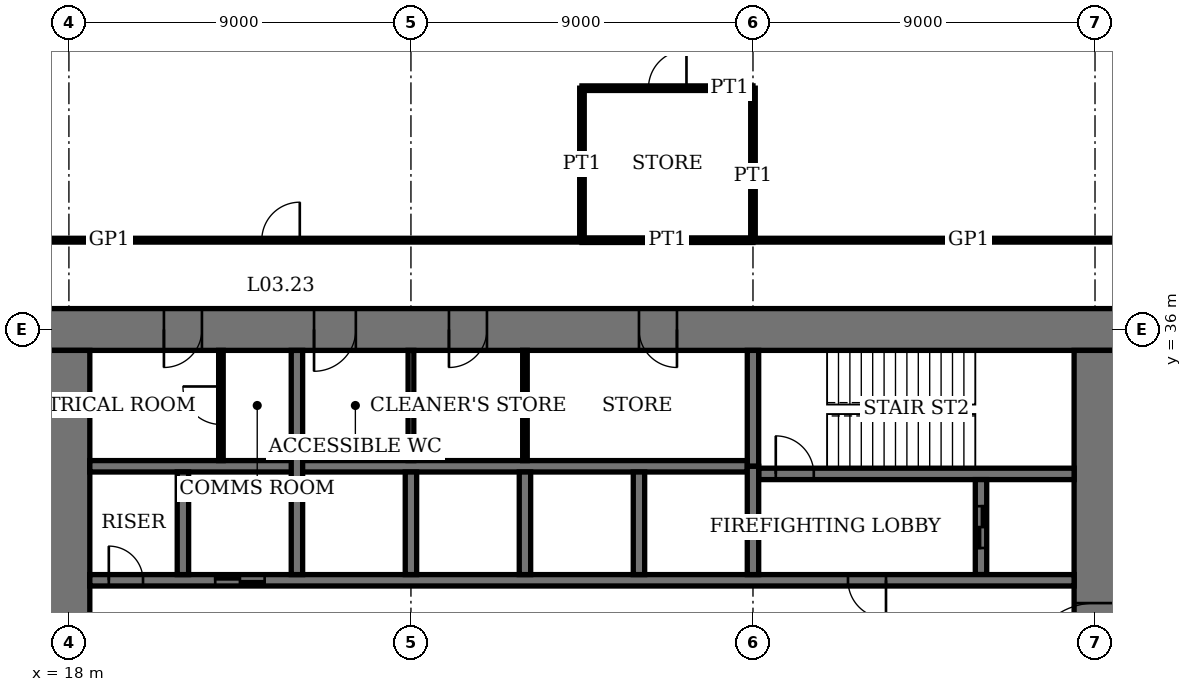
"""IFC4 building model, lengths in metres.
Left out: names, types, materials, properties, quantities, classifications, styles, units other than length and angle.
Written with IfcOpenShell. Run it as: python <this file> out.ifc"""

import sys

from ifc_helpers import new_model, si_unit, direction, frame, frame_2d, origin, place, context, subcontext, project, spatial, rectangle, extrude, element, fill, save


model = new_model("IFC4")
c1 = context("Model", 3, precision=1e-05, world=origin(), true_north=direction((0.0, 1.0)))
c2 = subcontext(c1, "Body", "Model", "MODEL_VIEW")
j1 = project(units=[si_unit("LENGTHUNIT", "METRE"), si_unit("PLANEANGLEUNIT", "RADIAN")], contexts=[c1])
p1 = place(None, origin())
s1 = spatial("IfcSite", under=j1, at=p1, CompositionType="ELEMENT")
p2 = place(p1, origin())
s2 = spatial("IfcBuilding", under=s1, at=p2, CompositionType="ELEMENT")
p3 = place(p2, frame((0.0, 0.0, 15.8)))
s3 = spatial("IfcBuildingStorey", under=s2, at=p3, CompositionType="ELEMENT", Elevation=15.8)
p4 = place(p3, frame((45.55, 36.0, 0.0), z_axis=(0.0, 0.0, 1.0), x_axis=(-1.0, 0.0, 0.0)))
e1 = element("IfcWall", 1, at=p4, inside=s3, PredefinedType="SHEAR", context=c2, shape_type="SweptSolid", body=[
    extrude(rectangle(XDim=28.1, YDim=1.1, at=frame_2d((14.05, 0.0))), origin(), (0.0, 0.0, 1.0), 4.0),
])
p5 = place(p4, frame((11.55, 0.0, 0.0)))
e2 = element("IfcOpeningElement", 2, at=p5, cuts=e1, PredefinedType="OPENING", context=c2, shape_type="SweptSolid", body=[
    extrude(rectangle(XDim=1.0, YDim=2.4, at=frame_2d((0.5, 1.2))), frame((0.0, 0.56, 0.0), z_axis=(0.0, -1.0, 0.0), x_axis=(1.0, 0.0, 0.0)), (0.0, 0.0, 1.0), 1.12),
])
p6 = place(p4, frame((16.55, 0.0, 0.0)))
e3 = element("IfcOpeningElement", 3, at=p6, cuts=e1, PredefinedType="OPENING", context=c2, shape_type="SweptSolid", body=[
    extrude(rectangle(XDim=1.0, YDim=2.4, at=frame_2d((0.5, 1.2))), frame((0.0, 0.56, 0.0), z_axis=(0.0, -1.0, 0.0), x_axis=(1.0, 0.0, 0.0)), (0.0, 0.0, 1.0), 1.12),
])
p7 = place(p4, frame((20.0, 0.0, 0.0)))
e4 = element("IfcOpeningElement", 4, at=p7, cuts=e1, PredefinedType="OPENING", context=c2, shape_type="SweptSolid", body=[
    extrude(rectangle(XDim=1.1, YDim=2.4, at=frame_2d((0.55, 1.2))), frame((0.0, 0.56, 0.0), z_axis=(0.0, -1.0, 0.0), x_axis=(1.0, 0.0, 0.0)), (0.0, 0.0, 1.0), 1.12),
])
p8 = place(p4, frame((24.05, 0.0, 0.0)))
e5 = element("IfcOpeningElement", 5, at=p8, cuts=e1, PredefinedType="OPENING", context=c2, shape_type="SweptSolid", body=[
    extrude(rectangle(XDim=1.0, YDim=2.4, at=frame_2d((0.5, 1.2))), frame((0.0, 0.56, 0.0), z_axis=(0.0, -1.0, 0.0), x_axis=(1.0, 0.0, 0.0)), (0.0, 0.0, 1.0), 1.12),
])
p9 = place(p3, frame((18.0, 35.45, 0.0), z_axis=(0.0, 0.0, 1.0), x_axis=(0.0, -1.0, 0.0)))
e6 = element("IfcWall", 6, at=p9, inside=s3, PredefinedType="SHEAR", context=c2, shape_type="SweptSolid", body=[
    extrude(rectangle(XDim=16.9, YDim=1.1, at=frame_2d((8.45, 0.0))), origin(), (0.0, 0.0, 1.0), 4.0),
])
p10 = place(p9, frame((8.45, 0.0, 0.0)))
e7 = element("IfcOpeningElement", 7, at=p10, cuts=e6, PredefinedType="OPENING", context=c2, shape_type="SweptSolid", body=[
    extrude(rectangle(XDim=1.8, YDim=2.4, at=frame_2d((0.9, 1.2))), frame((0.0, 0.56, 0.0), z_axis=(0.0, -1.0, 0.0), x_axis=(1.0, 0.0, 0.0)), (0.0, 0.0, 1.0), 1.12),
])
p11 = place(p3, frame((45.0, 18.55, 0.0), z_axis=(0.0, 0.0, 1.0), x_axis=(0.0, 1.0, 0.0)))
e8 = element("IfcWall", 8, at=p11, inside=s3, PredefinedType="SHEAR", context=c2, shape_type="SweptSolid", body=[
    extrude(rectangle(XDim=16.9, YDim=1.1, at=frame_2d((8.45, 0.0))), origin(), (0.0, 0.0, 1.0), 4.0),
])
p12 = place(p11, frame((8.45, 0.0, 0.0)))
e9 = element("IfcOpeningElement", 9, at=p12, cuts=e8, PredefinedType="OPENING", context=c2, shape_type="SweptSolid", body=[
    extrude(rectangle(XDim=1.8, YDim=2.4, at=frame_2d((0.9, 1.2))), frame((0.0, 0.56, 0.0), z_axis=(0.0, -1.0, 0.0), x_axis=(1.0, 0.0, 0.0)), (0.0, 0.0, 1.0), 1.12),
])
p13 = place(p3, frame((36.15, 32.2, 0.0), z_axis=(0.0, 0.0, 1.0), x_axis=(1.0, 0.0, 0.0)))
e10 = element("IfcWall", 10, at=p13, inside=s3, PredefinedType="SHEAR", context=c2, shape_type="SweptSolid", body=[
    extrude(rectangle(XDim=8.3, YDim=0.3, at=frame_2d((4.15, 0.0))), origin(), (0.0, 0.0, 1.0), 4.0),
])
p14 = place(p13, frame((0.45, 0.0, 0.0)))
e11 = element("IfcOpeningElement", 11, at=p14, cuts=e10, PredefinedType="OPENING", context=c2, shape_type="SweptSolid", body=[
    extrude(rectangle(XDim=1.0, YDim=2.4, at=frame_2d((0.5, 1.2))), frame((0.0, 0.16, 0.0), z_axis=(0.0, -1.0, 0.0), x_axis=(1.0, 0.0, 0.0)), (0.0, 0.0, 1.0), 0.32),
])
p15 = place(p3, frame((36.0, 32.4, 0.0), z_axis=(0.0, 0.0, 1.0), x_axis=(0.0, 1.0, 0.0)))
e12 = element("IfcWall", 12, at=p15, inside=s3, PredefinedType="SHEAR", context=c2, shape_type="SweptSolid", body=[
    extrude(rectangle(XDim=3.05, YDim=0.3, at=frame_2d((1.525, 0.0))), origin(), (0.0, 0.0, 1.0), 4.0),
])
p16 = place(p3, frame((42.0, 29.55, 0.0), z_axis=(0.0, 0.0, 1.0), x_axis=(0.0, 1.0, 0.0)))
e13 = element("IfcWall", 13, at=p16, inside=s3, PredefinedType="SHEAR", context=c2, shape_type="SweptSolid", body=[
    extrude(rectangle(XDim=2.5, YDim=0.3, at=frame_2d((1.25, 0.0))), origin(), (0.0, 0.0, 1.0), 4.0),
])
p17 = place(p16, frame((0.7, 0.0, 0.0)))
e14 = element("IfcOpeningElement", 14, at=p17, cuts=e13, PredefinedType="OPENING", context=c2, shape_type="SweptSolid", body=[
    extrude(rectangle(XDim=1.1, YDim=2.4, at=frame_2d((0.55, 1.2))), frame((0.0, 0.16, 0.0), z_axis=(0.0, -1.0, 0.0), x_axis=(1.0, 0.0, 0.0)), (0.0, 0.0, 1.0), 0.32),
])
p18 = place(p3, frame((18.55, 29.4, 0.0), z_axis=(0.0, 0.0, 1.0), x_axis=(1.0, 0.0, 0.0)))
e15 = element("IfcWall", 15, at=p18, inside=s3, PredefinedType="SHEAR", context=c2, shape_type="SweptSolid", body=[
    extrude(rectangle(XDim=25.9, YDim=0.3, at=frame_2d((12.95, 0.0))), origin(), (0.0, 0.0, 1.0), 4.0),
])
p19 = place(p18, frame((19.95, 0.0, 0.0)))
e16 = element("IfcOpeningElement", 16, at=p19, cuts=e15, PredefinedType="OPENING", context=c2, shape_type="SweptSolid", body=[
    extrude(rectangle(XDim=1.0, YDim=2.4, at=frame_2d((0.5, 1.2))), frame((0.0, 0.16, 0.0), z_axis=(0.0, -1.0, 0.0), x_axis=(1.0, 0.0, 0.0)), (0.0, 0.0, 1.0), 0.32),
])
p20 = place(p18, frame((0.5, 0.0, 0.0)))
e17 = element("IfcOpeningElement", 17, at=p20, cuts=e15, PredefinedType="OPENING", context=c2, shape_type="SweptSolid", body=[
    extrude(rectangle(XDim=0.9, YDim=2.1, at=frame_2d((0.45, 1.05))), frame((0.0, 0.16, 0.0), z_axis=(0.0, -1.0, 0.0), x_axis=(1.0, 0.0, 0.0)), (0.0, 0.0, 1.0), 0.32),
])
p21 = place(p18, frame((3.3, 0.0, 0.0)))
e18 = element("IfcOpeningElement", 18, at=p21, cuts=e15, PredefinedType="OPENING", context=c2, shape_type="SweptSolid", body=[
    extrude(rectangle(XDim=1.3, YDim=2.4, at=frame_2d((0.65, 1.2))), frame((0.0, 0.16, 0.0), z_axis=(0.0, -1.0, 0.0), x_axis=(1.0, 0.0, 0.0)), (0.0, 0.0, 1.0), 0.32),
])
p22 = place(p3, frame((18.55, 32.4, 0.0), z_axis=(0.0, 0.0, 1.0), x_axis=(1.0, 0.0, 0.0)))
e19 = element("IfcWall", 19, at=p22, inside=s3, PredefinedType="SHEAR", context=c2, shape_type="SweptSolid", body=[
    extrude(rectangle(XDim=17.3, YDim=0.3, at=frame_2d((8.65, 0.0))), origin(), (0.0, 0.0, 1.0), 4.0),
])
for number, where, z_axis, x_axis in (
    (20, (33.0, 29.55, 0.0), (0.0, 0.0, 1.0), (0.0, 1.0, 0.0)),
    (21, (30.0, 29.55, 0.0), (0.0, 0.0, 1.0), (0.0, 1.0, 0.0)),
    (22, (27.0, 29.55, 0.0), (0.0, 0.0, 1.0), (0.0, 1.0, 0.0)),
):
    element("IfcWall", number, at=place(p3, frame(where, z_axis=z_axis, x_axis=x_axis)), inside=s3, PredefinedType="SHEAR", context=c2, shape_type="SweptSolid", body=[
        extrude(rectangle(XDim=2.7, YDim=0.3, at=frame_2d((1.35, 0.0))), origin(), (0.0, 0.0, 1.0), 4.0),
    ])
p23 = place(p3, frame((24.0, 29.55, 0.0), z_axis=(0.0, 0.0, 1.0), x_axis=(0.0, 1.0, 0.0)))
e23 = element("IfcWall", 23, at=p23, inside=s3, PredefinedType="SHEAR", context=c2, shape_type="SweptSolid", body=[
    extrude(rectangle(XDim=5.9, YDim=0.3, at=frame_2d((2.95, 0.0))), origin(), (0.0, 0.0, 1.0), 4.0),
])
p24 = place(p3, frame((21.0, 29.55, 0.0), z_axis=(0.0, 0.0, 1.0), x_axis=(0.0, 1.0, 0.0)))
e24 = element("IfcWall", 24, at=p24, inside=s3, PredefinedType="SHEAR", context=c2, shape_type="SweptSolid", body=[
    extrude(rectangle(XDim=2.7, YDim=0.3, at=frame_2d((1.35, 0.0))), origin(), (0.0, 0.0, 1.0), 4.0),
])
p25 = place(p3, frame((36.0, 29.55, 0.0), z_axis=(0.0, 0.0, 1.0), x_axis=(0.0, 1.0, 0.0)))
e25 = element("IfcWall", 25, at=p25, inside=s3, PredefinedType="SHEAR", context=c2, shape_type="SweptSolid", body=[
    extrude(rectangle(XDim=2.85, YDim=0.3, at=frame_2d((1.425, 0.0))), origin(), (0.0, 0.0, 1.0), 4.0),
])
p26 = place(p3, frame((31.5, 38.35, 0.0), z_axis=(0.0, 0.0, 1.0), x_axis=(1.0, 0.0, 0.0)))
e26 = element("IfcWall", 26, at=p26, inside=s3, PredefinedType="PARTITIONING", context=c2, shape_type="SweptSolid", body=[
    extrude(rectangle(XDim=4.5, YDim=0.12, at=frame_2d((2.25, 0.0))), origin(), (0.0, 0.0, 1.0), 3.75),
])
p27 = place(p3, frame((15.65, 38.35, 0.0), z_axis=(0.0, 0.0, 1.0), x_axis=(1.0, 0.0, 0.0)))
e27 = element("IfcWall", 27, at=p27, inside=s3, PredefinedType="PARTITIONING", context=c2, shape_type="SweptSolid", body=[
    extrude(rectangle(XDim=15.85, YDim=0.1, at=frame_2d((7.925, 0.0))), origin(), (0.0, 0.0, 1.0), 3.75),
])
p28 = place(p27, frame((7.425, 0.0, 0.0)))
e28 = element("IfcOpeningElement", 28, at=p28, cuts=e27, PredefinedType="OPENING", context=c2, shape_type="SweptSolid", body=[
    extrude(rectangle(XDim=1.0, YDim=2.4, at=frame_2d((0.5, 1.2))), frame((0.0, 0.06, 0.0), z_axis=(0.0, -1.0, 0.0), x_axis=(1.0, 0.0, 0.0)), (0.0, 0.0, 1.0), 0.12),
])
p29 = place(p3, frame((36.0, 38.35, 0.0), z_axis=(0.0, 0.0, 1.0), x_axis=(1.0, 0.0, 0.0)))
e29 = element("IfcWall", 29, at=p29, inside=s3, PredefinedType="PARTITIONING", context=c2, shape_type="SweptSolid", body=[
    extrude(rectangle(XDim=11.35, YDim=0.1, at=frame_2d((5.675, 0.0))), origin(), (0.0, 0.0, 1.0), 3.75),
])
p30 = place(p3, frame((31.5, 42.35, 0.0), z_axis=(0.0, 0.0, 1.0), x_axis=(1.0, 0.0, 0.0)))
e30 = element("IfcWall", 30, at=p30, inside=s3, PredefinedType="PARTITIONING", context=c2, shape_type="SweptSolid", body=[
    extrude(rectangle(XDim=4.5, YDim=0.12, at=frame_2d((2.25, 0.0))), origin(), (0.0, 0.0, 1.0), 3.75),
])
p31 = place(p30, frame((1.75, 0.0, 0.0)))
e31 = element("IfcOpeningElement", 31, at=p31, cuts=e30, PredefinedType="OPENING", context=c2, shape_type="SweptSolid", body=[
    extrude(rectangle(XDim=1.0, YDim=2.4, at=frame_2d((0.5, 1.2))), frame((0.0, 0.07, 0.0), z_axis=(0.0, -1.0, 0.0), x_axis=(1.0, 0.0, 0.0)), (0.0, 0.0, 1.0), 0.14),
])
p32 = place(p3, frame((31.5, 38.35, 0.0), z_axis=(0.0, 0.0, 1.0), x_axis=(0.0, 1.0, 0.0)))
e32 = element("IfcWall", 32, at=p32, inside=s3, PredefinedType="PARTITIONING", context=c2, shape_type="SweptSolid", body=[
    extrude(rectangle(XDim=4.0, YDim=0.12, at=frame_2d((2.0, 0.0))), origin(), (0.0, 0.0, 1.0), 3.75),
])
p33 = place(p3, frame((36.0, 38.35, 0.0), z_axis=(0.0, 0.0, 1.0), x_axis=(0.0, 1.0, 0.0)))
e33 = element("IfcWall", 33, at=p33, inside=s3, PredefinedType="PARTITIONING", context=c2, shape_type="SweptSolid", body=[
    extrude(rectangle(XDim=4.0, YDim=0.12, at=frame_2d((2.0, 0.0))), origin(), (0.0, 0.0, 1.0), 3.05),
])
p34 = place(p3, frame((30.0, 32.55, 0.0), z_axis=(0.0, 0.0, 1.0), x_axis=(0.0, 1.0, 0.0)))
e34 = element("IfcWall", 34, at=p34, inside=s3, PredefinedType="PARTITIONING", context=c2, shape_type="SweptSolid", body=[
    extrude(rectangle(XDim=2.9, YDim=0.12, at=frame_2d((1.45, 0.0))), origin(), (0.0, 0.0, 1.0), 3.75),
])
p35 = place(p3, frame((27.0, 32.55, 0.0), z_axis=(0.0, 0.0, 1.0), x_axis=(0.0, 1.0, 0.0)))
e35 = element("IfcWall", 35, at=p35, inside=s3, PredefinedType="PARTITIONING", context=c2, shape_type="SweptSolid", body=[
    extrude(rectangle(XDim=2.9, YDim=0.15, at=frame_2d((1.45, 0.0))), origin(), (0.0, 0.0, 1.0), 3.75),
])
p36 = place(p3, frame((22.0, 32.55, 0.0), z_axis=(0.0, 0.0, 1.0), x_axis=(0.0, 1.0, 0.0)))
e36 = element("IfcWall", 36, at=p36, inside=s3, PredefinedType="PARTITIONING", context=c2, shape_type="SweptSolid", body=[
    extrude(rectangle(XDim=2.9, YDim=0.12, at=frame_2d((1.45, 0.0))), origin(), (0.0, 0.0, 1.0), 3.75),
])
p37 = place(p36, frame((0.95, 0.0, 0.0)))
e37 = element("IfcOpeningElement", 37, at=p37, cuts=e36, PredefinedType="OPENING", context=c2, shape_type="SweptSolid", body=[
    extrude(rectangle(XDim=1.0, YDim=2.4, at=frame_2d((0.5, 1.2))), frame((0.0, 0.07, 0.0), z_axis=(0.0, -1.0, 0.0), x_axis=(1.0, 0.0, 0.0)), (0.0, 0.0, 1.0), 0.14),
])
p38 = place(p12, origin())
e38 = element("IfcDoor", 38, at=p38, inside=s3, OperationType="DOUBLE_DOOR_DOUBLE_SWING", PredefinedType="DOOR", context=c2, shape_type="SweptSolid", body=[
    extrude(rectangle(XDim=1.8, YDim=2.4, at=frame_2d((0.9, 1.2))), frame((0.0, 0.03, 0.0), z_axis=(0.0, -1.0, 0.0), x_axis=(1.0, 0.0, 0.0)), (0.0, 0.0, 1.0), 0.06),
    extrude(rectangle(XDim=0.04, YDim=2.4, at=frame_2d((0.02, 1.2))), frame((0.0, 0.55, 0.0), z_axis=(0.0, -1.0, 0.0), x_axis=(1.0, 0.0, 0.0)), (0.0, 0.0, 1.0), 1.1),
    extrude(rectangle(XDim=0.04, YDim=2.4, at=frame_2d((1.78, 1.2))), frame((0.0, 0.55, 0.0), z_axis=(0.0, -1.0, 0.0), x_axis=(1.0, 0.0, 0.0)), (0.0, 0.0, 1.0), 1.1),
    extrude(rectangle(XDim=1.8, YDim=0.04, at=frame_2d((0.9, 2.38))), frame((0.0, 0.55, 0.0), z_axis=(0.0, -1.0, 0.0), x_axis=(1.0, 0.0, 0.0)), (0.0, 0.0, 1.0), 1.1),
])
fill(e9, e38)
p39 = place(p5, origin())
e39 = element("IfcDoor", 39, at=p39, inside=s3, OperationType="SINGLE_SWING_RIGHT", PredefinedType="DOOR", context=c2, shape_type="SweptSolid", body=[
    extrude(rectangle(XDim=1.0, YDim=2.4, at=frame_2d((0.5, 1.2))), frame((0.0, 0.025, 0.0), z_axis=(0.0, -1.0, 0.0), x_axis=(1.0, 0.0, 0.0)), (0.0, 0.0, 1.0), 0.05),
    extrude(rectangle(XDim=0.04, YDim=2.4, at=frame_2d((0.02, 1.2))), frame((0.0, 0.4, 0.0), z_axis=(0.0, -1.0, 0.0), x_axis=(1.0, 0.0, 0.0)), (0.0, 0.0, 1.0), 0.8),
    extrude(rectangle(XDim=0.04, YDim=2.4, at=frame_2d((0.98, 1.2))), frame((0.0, 0.4, 0.0), z_axis=(0.0, -1.0, 0.0), x_axis=(1.0, 0.0, 0.0)), (0.0, 0.0, 1.0), 0.8),
    extrude(rectangle(XDim=1.0, YDim=0.04, at=frame_2d((0.5, 2.38))), frame((0.0, 0.4, 0.0), z_axis=(0.0, -1.0, 0.0), x_axis=(1.0, 0.0, 0.0)), (0.0, 0.0, 1.0), 0.8),
])
fill(e2, e39)
p40 = place(p6, origin())
e40 = element("IfcDoor", 40, at=p40, inside=s3, OperationType="SINGLE_SWING_LEFT", PredefinedType="DOOR", context=c2, shape_type="SweptSolid", body=[
    extrude(rectangle(XDim=1.0, YDim=2.4, at=frame_2d((0.5, 1.2))), frame((0.0, 0.025, 0.0), z_axis=(0.0, -1.0, 0.0), x_axis=(1.0, 0.0, 0.0)), (0.0, 0.0, 1.0), 0.05),
    extrude(rectangle(XDim=0.04, YDim=2.4, at=frame_2d((0.02, 1.2))), frame((0.0, 0.4, 0.0), z_axis=(0.0, -1.0, 0.0), x_axis=(1.0, 0.0, 0.0)), (0.0, 0.0, 1.0), 0.8),
    extrude(rectangle(XDim=0.04, YDim=2.4, at=frame_2d((0.98, 1.2))), frame((0.0, 0.4, 0.0), z_axis=(0.0, -1.0, 0.0), x_axis=(1.0, 0.0, 0.0)), (0.0, 0.0, 1.0), 0.8),
    extrude(rectangle(XDim=1.0, YDim=0.04, at=frame_2d((0.5, 2.38))), frame((0.0, 0.4, 0.0), z_axis=(0.0, -1.0, 0.0), x_axis=(1.0, 0.0, 0.0)), (0.0, 0.0, 1.0), 0.8),
])
fill(e3, e40)
p41 = place(p7, origin())
e41 = element("IfcDoor", 41, at=p41, inside=s3, OperationType="SINGLE_SWING_LEFT", PredefinedType="DOOR", context=c2, shape_type="SweptSolid", body=[
    extrude(rectangle(XDim=1.1, YDim=2.4, at=frame_2d((0.55, 1.2))), frame((0.0, 0.025, 0.0), z_axis=(0.0, -1.0, 0.0), x_axis=(1.0, 0.0, 0.0)), (0.0, 0.0, 1.0), 0.05),
    extrude(rectangle(XDim=0.04, YDim=2.4, at=frame_2d((0.02, 1.2))), frame((0.0, 0.44, 0.0), z_axis=(0.0, -1.0, 0.0), x_axis=(1.0, 0.0, 0.0)), (0.0, 0.0, 1.0), 0.88),
    extrude(rectangle(XDim=0.04, YDim=2.4, at=frame_2d((1.08, 1.2))), frame((0.0, 0.44, 0.0), z_axis=(0.0, -1.0, 0.0), x_axis=(1.0, 0.0, 0.0)), (0.0, 0.0, 1.0), 0.88),
    extrude(rectangle(XDim=1.1, YDim=0.04, at=frame_2d((0.55, 2.38))), frame((0.0, 0.44, 0.0), z_axis=(0.0, -1.0, 0.0), x_axis=(1.0, 0.0, 0.0)), (0.0, 0.0, 1.0), 0.88),
])
fill(e4, e41)
p42 = place(p8, origin())
e42 = element("IfcDoor", 42, at=p42, inside=s3, OperationType="SINGLE_SWING_LEFT", PredefinedType="DOOR", context=c2, shape_type="SweptSolid", body=[
    extrude(rectangle(XDim=1.0, YDim=2.4, at=frame_2d((0.5, 1.2))), frame((0.0, 0.025, 0.0), z_axis=(0.0, -1.0, 0.0), x_axis=(1.0, 0.0, 0.0)), (0.0, 0.0, 1.0), 0.05),
    extrude(rectangle(XDim=0.04, YDim=2.4, at=frame_2d((0.02, 1.2))), frame((0.0, 0.4, 0.0), z_axis=(0.0, -1.0, 0.0), x_axis=(1.0, 0.0, 0.0)), (0.0, 0.0, 1.0), 0.8),
    extrude(rectangle(XDim=0.04, YDim=2.4, at=frame_2d((0.98, 1.2))), frame((0.0, 0.4, 0.0), z_axis=(0.0, -1.0, 0.0), x_axis=(1.0, 0.0, 0.0)), (0.0, 0.0, 1.0), 0.8),
    extrude(rectangle(XDim=1.0, YDim=0.04, at=frame_2d((0.5, 2.38))), frame((0.0, 0.4, 0.0), z_axis=(0.0, -1.0, 0.0), x_axis=(1.0, 0.0, 0.0)), (0.0, 0.0, 1.0), 0.8),
])
fill(e5, e42)
p43 = place(p14, origin())
e43 = element("IfcDoor", 43, at=p43, inside=s3, OperationType="SINGLE_SWING_RIGHT", PredefinedType="DOOR", context=c2, shape_type="SweptSolid", body=[
    extrude(rectangle(XDim=1.0, YDim=2.4, at=frame_2d((0.5, 1.2))), frame((0.0, 0.03, 0.0), z_axis=(0.0, -1.0, 0.0), x_axis=(1.0, 0.0, 0.0)), (0.0, 0.0, 1.0), 0.06),
])
fill(e11, e43)
p44 = place(p19, origin())
e44 = element("IfcDoor", 44, at=p44, inside=s3, OperationType="SINGLE_SWING_RIGHT", PredefinedType="DOOR", context=c2, shape_type="SweptSolid", body=[
    extrude(rectangle(XDim=1.0, YDim=2.4, at=frame_2d((0.5, 1.2))), frame((0.0, 0.03, 0.0), z_axis=(0.0, -1.0, 0.0), x_axis=(1.0, 0.0, 0.0)), (0.0, 0.0, 1.0), 0.06),
])
fill(e16, e44)
p45 = place(p20, origin())
e45 = element("IfcDoor", 45, at=p45, inside=s3, OperationType="SINGLE_SWING_RIGHT", PredefinedType="DOOR", context=c2, shape_type="SweptSolid", body=[
    extrude(rectangle(XDim=0.9, YDim=2.1, at=frame_2d((0.45, 1.05))), frame((0.0, 0.03, 0.0), z_axis=(0.0, -1.0, 0.0), x_axis=(1.0, 0.0, 0.0)), (0.0, 0.0, 1.0), 0.06),
])
fill(e17, e45)
p46 = place(p28, origin())
e46 = element("IfcDoor", 46, at=p46, inside=s3, OperationType="SINGLE_SWING_LEFT", PredefinedType="DOOR", context=c2, shape_type="SweptSolid", body=[
    extrude(rectangle(XDim=1.0, YDim=2.4, at=frame_2d((0.5, 1.2))), frame((0.0, 0.02, 0.0), z_axis=(0.0, -1.0, 0.0), x_axis=(1.0, 0.0, 0.0)), (0.0, 0.0, 1.0), 0.04),
])
fill(e28, e46)
p47 = place(p31, origin())
e47 = element("IfcDoor", 47, at=p47, inside=s3, OperationType="SINGLE_SWING_LEFT", PredefinedType="DOOR", context=c2, shape_type="SweptSolid", body=[
    extrude(rectangle(XDim=1.0, YDim=2.4, at=frame_2d((0.5, 1.2))), frame((0.0, 0.025, 0.0), z_axis=(0.0, -1.0, 0.0), x_axis=(1.0, 0.0, 0.0)), (0.0, 0.0, 1.0), 0.05),
])
fill(e31, e47)
p48 = place(p37, origin())
e48 = element("IfcDoor", 48, at=p48, inside=s3, OperationType="SINGLE_SWING_LEFT", PredefinedType="DOOR", context=c2, shape_type="SweptSolid", body=[
    extrude(rectangle(XDim=1.0, YDim=2.4, at=frame_2d((0.5, 1.2))), frame((0.0, 0.03, 0.0), z_axis=(0.0, -1.0, 0.0), x_axis=(1.0, 0.0, 0.0)), (0.0, 0.0, 1.0), 0.06),
])
fill(e37, e48)
p49 = place(p21, origin())
e49 = element("IfcDoor", 49, at=p49, inside=s3, OperationType="DOUBLE_DOOR_SLIDING", PredefinedType="DOOR", context=c2, shape_type="SweptSolid", body=[
    extrude(rectangle(XDim=1.3, YDim=2.4, at=frame_2d((0.65, 1.2))), frame((0.0, 0.02, 0.0), z_axis=(0.0, -1.0, 0.0), x_axis=(1.0, 0.0, 0.0)), (0.0, 0.0, 1.0), 0.04),
])
fill(e18, e49)
p50 = place(p17, origin())
e50 = element("IfcDoor", 50, at=p50, inside=s3, OperationType="DOUBLE_DOOR_SLIDING", PredefinedType="DOOR", context=c2, shape_type="SweptSolid", body=[
    extrude(rectangle(XDim=1.1, YDim=2.4, at=frame_2d((0.55, 1.2))), frame((0.0, 0.03, 0.0), z_axis=(0.0, -1.0, 0.0), x_axis=(1.0, 0.0, 0.0)), (0.0, 0.0, 1.0), 0.06),
])
fill(e14, e50)
save(model, sys.argv[1])
